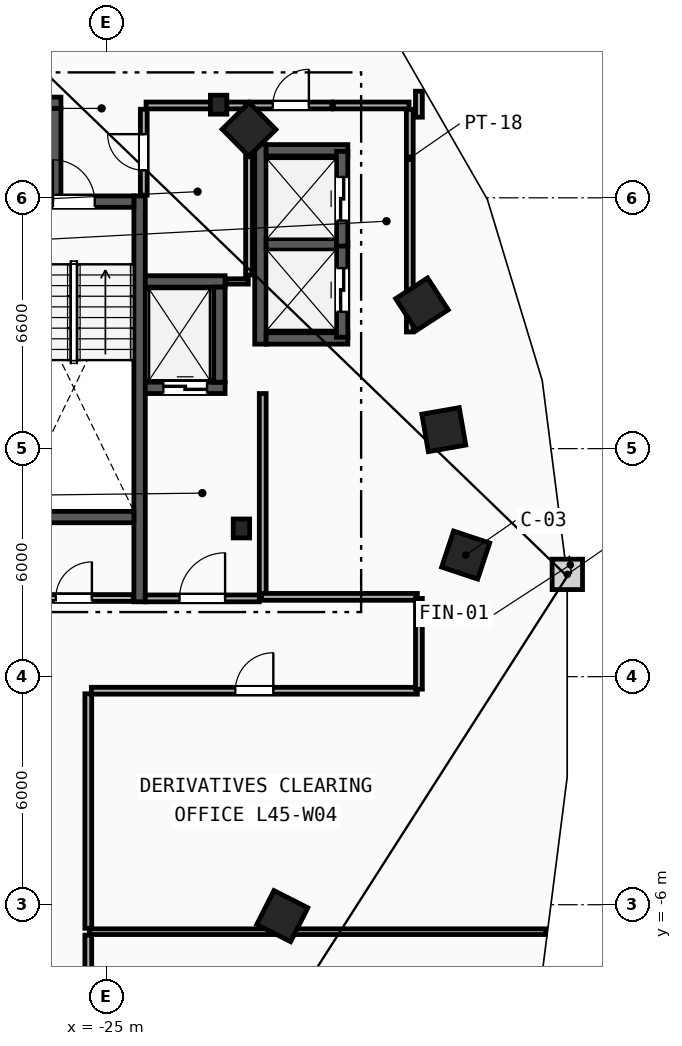
"""IFC4 building model, lengths in metres.
Left out: names, types, materials, properties, quantities, classifications, styles, units other than length and angle.
Written with IfcOpenShell. Run it as: python <this file> out.ifc"""

import sys

from ifc_helpers import new_model, si_unit, direction, frame, frame_2d, origin, origin_2d, place, context, subcontext, project, spatial, rectangle, i_section, extrude, element, fill, save


model = new_model("IFC4")
c1 = context("Model", 3, precision=1e-05, world=origin(), true_north=direction((0.0, 1.0)))
c2 = subcontext(c1, "Body", "Model", "MODEL_VIEW")
j1 = project(units=[si_unit("LENGTHUNIT", "METRE"), si_unit("PLANEANGLEUNIT", "RADIAN")], contexts=[c1])
p1 = place(None, origin())
s1 = spatial("IfcSite", under=j1, at=p1, CompositionType="ELEMENT")
p2 = place(p1, origin())
s2 = spatial("IfcBuilding", under=s1, at=p2, CompositionType="ELEMENT")
p3 = place(p2, frame((0.0, 0.0, 172.8)))
s3 = spatial("IfcBuildingStorey", under=s2, at=p3, CompositionType="ELEMENT", Elevation=172.8)
for number, where, z_axis, x_axis in (
    (1, (-21.45, 3.9, 0.0), (0.0, 0.0, 1.0), (1.0, 0.0, 0.0)),
    (2, (-22.05, 15.05, 0.0), (0.0, 0.0, 1.0), (1.0, 0.0, 0.0)),
):
    element("IfcColumn", number, at=place(p3, frame(where, z_axis=z_axis, x_axis=x_axis)), inside=s3, PredefinedType="COLUMN", context=c2, shape_type="SweptSolid", body=[
        extrude(i_section(OverallWidth=0.432, OverallDepth=0.498, WebThickness=0.056, FlangeThickness=0.089, FilletRadius=0.018, at=origin_2d()), origin(), (0.0, 0.0, 1.0), 3.6),
    ])
for number, where, z_axis, x_axis in (
    (3, (-15.55, 3.2, 0.0), (0.0, 0.0, 1.0), (0.315, 0.949, 0.0)),
    (4, (-16.125, 6.5, 0.0), (0.0, 0.0, 1.0), (-0.172, 0.985, 0.0)),
    (5, (-16.7, 9.8, 0.0), (0.0, 0.0, 1.0), (-0.544, 0.839, 0.0)),
    (6, (-21.25, 14.4, 0.0), (0.0, 0.0, 1.0), (-0.703, 0.711, 0.0)),
    (7, (-20.375, -6.3, 0.0), (0.0, 0.0, 1.0), (0.453, 0.892, 0.0)),
):
    element("IfcColumn", number, at=place(p3, frame(where, z_axis=z_axis, x_axis=x_axis)), inside=s3, PredefinedType="COLUMN", context=c2, shape_type="SweptSolid", body=[
        extrude(rectangle(XDim=1.0, YDim=1.0, at=origin_2d()), origin(), (0.0, 0.0, 1.0), 3.6),
    ])
p4 = place(p3, frame((-24.13, 1.97, 0.0), z_axis=(0.0, 0.0, 1.0), x_axis=(0.0, 1.0, 0.0)))
e8 = element("IfcWall", 8, at=p4, inside=s3, PredefinedType="SHEAR", context=c2, shape_type="SweptSolid", body=[
    extrude(rectangle(XDim=10.68, YDim=0.3, at=frame_2d((5.34, 0.0))), origin(), (0.0, 0.0, 1.0), 3.36),
])
p5 = place(p3, frame((-27.44, 12.5, 0.0), z_axis=(0.0, 0.0, 1.0), x_axis=(1.0, 0.0, 0.0)))
e9 = element("IfcWall", 9, at=p5, inside=s3, PredefinedType="SHEAR", context=c2, shape_type="SweptSolid", body=[
    extrude(rectangle(XDim=3.16, YDim=0.3, at=frame_2d((1.58, 0.0))), origin(), (0.0, 0.0, 1.0), 3.36),
])
p6 = place(p5, frame((1.03, 0.0, 0.0)))
e10 = element("IfcOpeningElement", 10, at=p6, cuts=e9, PredefinedType="OPENING", context=c2, shape_type="SweptSolid", body=[
    extrude(rectangle(XDim=1.1, YDim=2.15, at=frame_2d((0.55, 1.075))), frame((0.0, 0.16, 0.0), z_axis=(0.0, -1.0, 0.0), x_axis=(1.0, 0.0, 0.0)), (0.0, 0.0, 1.0), 0.32),
])
p7 = place(p3, frame((-27.44, 4.2, 0.0), z_axis=(0.0, 0.0, 1.0), x_axis=(1.0, 0.0, 0.0)))
e11 = element("IfcWall", 11, at=p7, inside=s3, PredefinedType="SHEAR", context=c2, shape_type="SweptSolid", body=[
    extrude(rectangle(XDim=3.16, YDim=0.3, at=frame_2d((1.58, 0.0))), origin(), (0.0, 0.0, 1.0), 3.36),
])
p8 = place(p3, frame((-20.89, 2.15, 0.0), z_axis=(0.0, 0.0, 1.0), x_axis=(0.0, 1.0, 0.0)))
e12 = element("IfcWall", 12, at=p8, inside=s3, PredefinedType="PARTITIONING", context=c2, shape_type="SweptSolid", body=[
    extrude(rectangle(XDim=5.3, YDim=0.18, at=frame_2d((2.65, 0.0))), origin(), (0.0, 0.0, 1.0), 3.36),
])
p9 = place(p3, frame((-23.98, 2.06, 0.0), z_axis=(0.0, 0.0, 1.0), x_axis=(1.0, 0.0, 0.0)))
e13 = element("IfcWall", 13, at=p9, inside=s3, PredefinedType="PARTITIONING", context=c2, shape_type="SweptSolid", body=[
    extrude(rectangle(XDim=3.0, YDim=0.18, at=frame_2d((1.5, 0.0))), origin(), (0.0, 0.0, 1.0), 3.36),
])
p10 = place(p9, frame((0.9, 0.0, 0.0)))
e14 = element("IfcOpeningElement", 14, at=p10, cuts=e13, PredefinedType="OPENING", context=c2, shape_type="SweptSolid", body=[
    extrude(rectangle(XDim=1.2, YDim=2.15, at=frame_2d((0.6, 1.075))), frame((0.0, 0.1, 0.0), z_axis=(0.0, -1.0, 0.0), x_axis=(1.0, 0.0, 0.0)), (0.0, 0.0, 1.0), 0.2),
])
p11 = place(p3, frame((-23.98, 7.6, 0.0), z_axis=(0.0, 0.0, 1.0), x_axis=(1.0, 0.0, 0.0)))
e15 = element("IfcWall", 15, at=p11, inside=s3, PredefinedType="SHEAR", context=c2, shape_type="SweptSolid", body=[
    extrude(rectangle(XDim=2.1, YDim=0.3, at=frame_2d((1.05, 0.0))), origin(), (0.0, 0.0, 1.0), 3.36),
])
p12 = place(p11, frame((0.475, 0.0, 0.0)))
e16 = element("IfcOpeningElement", 16, at=p12, cuts=e15, PredefinedType="OPENING", context=c2, shape_type="SweptSolid", body=[
    extrude(rectangle(XDim=1.15, YDim=2.2, at=frame_2d((0.575, 1.1))), frame((0.0, 0.16, 0.0), z_axis=(0.0, -1.0, 0.0), x_axis=(1.0, 0.0, 0.0)), (0.0, 0.0, 1.0), 0.32),
])
p13 = place(p3, frame((-23.98, 10.4, 0.0), z_axis=(0.0, 0.0, 1.0), x_axis=(1.0, 0.0, 0.0)))
e17 = element("IfcWall", 17, at=p13, inside=s3, PredefinedType="SHEAR", context=c2, shape_type="SweptSolid", body=[
    extrude(rectangle(XDim=2.1, YDim=0.3, at=frame_2d((1.05, 0.0))), origin(), (0.0, 0.0, 1.0), 3.36),
])
for number, where, z_axis, x_axis in (
    (18, (-22.03, 7.75, 0.0), (0.0, 0.0, 1.0), (0.0, 1.0, 0.0)),
    (19, (-28.7, 15.1, 0.0), (0.0, 0.0, 1.0), (1.0, 0.0, 0.0)),
):
    element("IfcWall", number, at=place(p3, frame(where, z_axis=z_axis, x_axis=x_axis)), inside=s3, PredefinedType="SHEAR", context=c2, shape_type="SweptSolid", body=[
        extrude(rectangle(XDim=2.5, YDim=0.3, at=frame_2d((1.25, 0.0))), origin(), (0.0, 0.0, 1.0), 3.36),
    ])
p14 = place(p3, frame((-26.35, 12.65, 0.0), z_axis=(0.0, 0.0, 1.0), x_axis=(0.0, 1.0, 0.0)))
e20 = element("IfcWall", 20, at=p14, inside=s3, PredefinedType="SHEAR", context=c2, shape_type="SweptSolid", body=[
    extrude(rectangle(XDim=2.3, YDim=0.3, at=frame_2d((1.15, 0.0))), origin(), (0.0, 0.0, 1.0), 3.36),
])
p15 = place(p3, frame((-20.95, 8.75, 0.0), z_axis=(0.0, 0.0, 1.0), x_axis=(0.0, 1.0, 0.0)))
e21 = element("IfcWall", 21, at=p15, inside=s3, PredefinedType="SHEAR", context=c2, shape_type="SweptSolid", body=[
    extrude(rectangle(XDim=5.25, YDim=0.3, at=frame_2d((2.625, 0.0))), origin(), (0.0, 0.0, 1.0), 3.36),
])
for number, where, z_axis, x_axis in (
    (22, (-20.8, 8.9, 0.0), (0.0, 0.0, 1.0), (1.0, 0.0, 0.0)),
    (23, (-20.8, 13.85, 0.0), (0.0, 0.0, 1.0), (1.0, 0.0, 0.0)),
):
    element("IfcWall", number, at=place(p3, frame(where, z_axis=z_axis, x_axis=x_axis)), inside=s3, PredefinedType="SHEAR", context=c2, shape_type="SweptSolid", body=[
        extrude(rectangle(XDim=2.15, YDim=0.3, at=frame_2d((1.075, 0.0))), origin(), (0.0, 0.0, 1.0), 3.36),
    ])
p16 = place(p3, frame((-20.8, 11.375, 0.0), z_axis=(0.0, 0.0, 1.0), x_axis=(1.0, 0.0, 0.0)))
e24 = element("IfcWall", 24, at=p16, inside=s3, PredefinedType="SHEAR", context=c2, shape_type="SweptSolid", body=[
    extrude(rectangle(XDim=1.85, YDim=0.3, at=frame_2d((0.925, 0.0))), origin(), (0.0, 0.0, 1.0), 3.36),
])
p17 = place(p3, frame((-18.8, 8.93, 0.0), z_axis=(0.0, 0.0, 1.0), x_axis=(0.0, 1.0, 0.0)))
e25 = element("IfcWall", 25, at=p17, inside=s3, PredefinedType="SHEAR", context=c2, shape_type="SweptSolid", body=[
    extrude(rectangle(XDim=2.49, YDim=0.3, at=frame_2d((1.245, 0.0))), origin(), (0.0, 0.0, 1.0), 3.36),
])
p18 = place(p17, frame((0.67, 0.0, 0.0)))
e26 = element("IfcOpeningElement", 26, at=p18, cuts=e25, PredefinedType="OPENING", context=c2, shape_type="SweptSolid", body=[
    extrude(rectangle(XDim=1.15, YDim=2.2, at=frame_2d((0.575, 1.1))), frame((0.0, 0.16, 0.0), z_axis=(0.0, -1.0, 0.0), x_axis=(1.0, 0.0, 0.0)), (0.0, 0.0, 1.0), 0.32),
])
p19 = place(p3, frame((-18.8, 11.33, 0.0), z_axis=(0.0, 0.0, 1.0), x_axis=(0.0, 1.0, 0.0)))
e27 = element("IfcWall", 27, at=p19, inside=s3, PredefinedType="SHEAR", context=c2, shape_type="SweptSolid", body=[
    extrude(rectangle(XDim=2.49, YDim=0.3, at=frame_2d((1.245, 0.0))), origin(), (0.0, 0.0, 1.0), 3.36),
])
p20 = place(p19, frame((0.67, 0.0, 0.0)))
e28 = element("IfcOpeningElement", 28, at=p20, cuts=e27, PredefinedType="OPENING", context=c2, shape_type="SweptSolid", body=[
    extrude(rectangle(XDim=1.15, YDim=2.2, at=frame_2d((0.575, 1.1))), frame((0.0, 0.16, 0.0), z_axis=(0.0, -1.0, 0.0), x_axis=(1.0, 0.0, 0.0)), (0.0, 0.0, 1.0), 0.32),
])
p21 = place(p3, frame((-17.02, 9.07, 0.0), z_axis=(0.0, 0.0, 1.0), x_axis=(0.0, 1.0, 0.0)))
e29 = element("IfcWall", 29, at=p21, inside=s3, PredefinedType="PARTITIONING", context=c2, shape_type="SweptSolid", body=[
    extrude(rectangle(XDim=5.86, YDim=0.18, at=frame_2d((2.93, 0.0))), origin(), (0.0, 0.0, 1.0), 3.36),
])
p22 = place(p3, frame((-21.23, 15.03, 0.0), z_axis=(0.0, 0.0, 1.0), x_axis=(1.0, 0.0, 0.0)))
e30 = element("IfcWall", 30, at=p22, inside=s3, PredefinedType="PARTITIONING", context=c2, shape_type="SweptSolid", body=[
    extrude(rectangle(XDim=2.16, YDim=0.18, at=frame_2d((1.08, 0.0))), origin(), (0.0, 0.0, 1.0), 3.36),
])
p23 = place(p22, frame((0.605, 0.0, 0.0)))
e31 = element("IfcOpeningElement", 31, at=p23, cuts=e30, PredefinedType="OPENING", context=c2, shape_type="SweptSolid", body=[
    extrude(rectangle(XDim=0.95, YDim=2.1, at=frame_2d((0.475, 1.05))), frame((0.0, 0.1, 0.0), z_axis=(0.0, -1.0, 0.0), x_axis=(1.0, 0.0, 0.0)), (0.0, 0.0, 1.0), 0.2),
])
p24 = place(p3, frame((-19.03, 15.03, 0.0), z_axis=(0.0, 0.0, 1.0), x_axis=(1.0, 0.0, 0.0)))
e32 = element("IfcWall", 32, at=p24, inside=s3, PredefinedType="PARTITIONING", context=c2, shape_type="SweptSolid", body=[
    extrude(rectangle(XDim=1.99, YDim=0.18, at=frame_2d((0.995, 0.0))), origin(), (0.0, 0.0, 1.0), 3.36),
])
p25 = place(p3, frame((-21.86, 10.4, 0.0), z_axis=(0.0, 0.0, 1.0), x_axis=(1.0, 0.0, 0.0)))
e33 = element("IfcWall", 33, at=p25, inside=s3, PredefinedType="PARTITIONING", context=c2, shape_type="SweptSolid", body=[
    extrude(rectangle(XDim=0.59, YDim=0.14, at=frame_2d((0.295, 0.0))), origin(), (0.0, 0.0, 1.0), 3.36),
])
p26 = place(p3, frame((-21.25, 10.57, 0.0), z_axis=(0.0, 0.0, 1.0), x_axis=(0.0, 1.0, 0.0)))
e34 = element("IfcWall", 34, at=p26, inside=s3, PredefinedType="PARTITIONING", context=c2, shape_type="SweptSolid", body=[
    extrude(rectangle(XDim=4.36, YDim=0.18, at=frame_2d((2.18, 0.0))), origin(), (0.0, 0.0, 1.0), 3.36),
])
p27 = place(p3, frame((-23.96, 15.03, 0.0), z_axis=(0.0, 0.0, 1.0), x_axis=(1.0, 0.0, 0.0)))
e35 = element("IfcWall", 35, at=p27, inside=s3, PredefinedType="PARTITIONING", context=c2, shape_type="SweptSolid", body=[
    extrude(rectangle(XDim=2.61, YDim=0.18, at=frame_2d((1.305, 0.0))), origin(), (0.0, 0.0, 1.0), 2.433),
])
p28 = place(p3, frame((-27.42, 2.07, 0.0), z_axis=(0.0, 0.0, 1.0), x_axis=(1.0, 0.0, 0.0)))
e36 = element("IfcWall", 36, at=p28, inside=s3, PredefinedType="PARTITIONING", context=c2, shape_type="SweptSolid", body=[
    extrude(rectangle(XDim=3.12, YDim=0.18, at=frame_2d((1.56, 0.0))), origin(), (0.0, 0.0, 1.0), 3.36),
])
p29 = place(p28, frame((1.085, 0.0, 0.0)))
e37 = element("IfcOpeningElement", 37, at=p29, cuts=e36, PredefinedType="OPENING", context=c2, shape_type="SweptSolid", body=[
    extrude(rectangle(XDim=0.95, YDim=2.1, at=frame_2d((0.475, 1.05))), frame((0.0, 0.1, 0.0), z_axis=(0.0, -1.0, 0.0), x_axis=(1.0, 0.0, 0.0)), (0.0, 0.0, 1.0), 0.2),
])
p30 = place(p3, frame((-24.02, 12.67, 0.0), z_axis=(0.0, 0.0, 1.0), x_axis=(0.0, 1.0, 0.0)))
e38 = element("IfcWall", 38, at=p30, inside=s3, PredefinedType="PARTITIONING", context=c2, shape_type="SweptSolid", body=[
    extrude(rectangle(XDim=2.26, YDim=0.18, at=frame_2d((1.13, 0.0))), origin(), (0.0, 0.0, 1.0), 3.36),
])
p31 = place(p30, frame((0.655, 0.0, 0.0)))
e39 = element("IfcOpeningElement", 39, at=p31, cuts=e38, PredefinedType="OPENING", context=c2, shape_type="SweptSolid", body=[
    extrude(rectangle(XDim=0.95, YDim=2.1, at=frame_2d((0.475, 1.05))), frame((0.0, 0.1, 0.0), z_axis=(0.0, -1.0, 0.0), x_axis=(1.0, 0.0, 0.0)), (0.0, 0.0, 1.0), 0.2),
])
p32 = place(p3, frame((-25.45, -6.71, 0.0), z_axis=(0.0, 0.0, 1.0), x_axis=(1.0, 0.0, 0.0)))
e40 = element("IfcWall", 40, at=p32, inside=s3, PredefinedType="PARTITIONING", context=c2, shape_type="SweptSolid", body=[
    extrude(rectangle(XDim=12.003, YDim=0.15, at=frame_2d((6.001, 0.0))), origin(), (0.0, 0.0, 1.0), 3.36),
])
p33 = place(p3, frame((-25.48, -11.178, 0.0), z_axis=(0.0, 0.0, 1.0), x_axis=(0.0, 1.0, 0.0)))
e41 = element("IfcWall", 41, at=p33, inside=s3, PredefinedType="PARTITIONING", context=c2, shape_type="SweptSolid", body=[
    extrude(rectangle(XDim=4.378, YDim=0.18, at=frame_2d((2.189, 0.0))), origin(), (0.0, 0.0, 1.0), 3.36),
])
p34 = place(p3, frame((-25.4, -0.37, 0.0), z_axis=(0.0, 0.0, 1.0), x_axis=(1.0, 0.0, 0.0)))
e42 = element("IfcWall", 42, at=p34, inside=s3, PredefinedType="PARTITIONING", context=c2, shape_type="SweptSolid", body=[
    extrude(rectangle(XDim=8.578, YDim=0.18, at=frame_2d((4.289, 0.0))), origin(), (0.0, 0.0, 1.0), 3.36),
])
p35 = place(p34, frame((3.789, 0.0, 0.0)))
e43 = element("IfcOpeningElement", 43, at=p35, cuts=e42, PredefinedType="OPENING", context=c2, shape_type="SweptSolid", body=[
    extrude(rectangle(XDim=1.0, YDim=2.15, at=frame_2d((0.5, 1.075))), frame((0.0, 0.1, 0.0), z_axis=(0.0, -1.0, 0.0), x_axis=(1.0, 0.0, 0.0)), (0.0, 0.0, 1.0), 0.2),
])
p36 = place(p3, frame((-25.48, -6.62, 0.0), z_axis=(0.0, 0.0, 1.0), x_axis=(0.0, 1.0, 0.0)))
e44 = element("IfcWall", 44, at=p36, inside=s3, PredefinedType="PARTITIONING", context=c2, shape_type="SweptSolid", body=[
    extrude(rectangle(XDim=6.17, YDim=0.18, at=frame_2d((3.085, 0.0))), origin(), (0.0, 0.0, 1.0), 3.36),
])
p37 = place(p3, frame((-16.822, 2.1, 0.0), z_axis=(0.0, 0.0, 1.0), x_axis=(-1.0, 0.0, 0.0)))
e45 = element("IfcWall", 45, at=p37, inside=s3, PredefinedType="PARTITIONING", context=c2, shape_type="SweptSolid", body=[
    extrude(rectangle(XDim=4.098, YDim=0.18, at=frame_2d((2.049, 0.0))), origin(), (0.0, 0.0, 1.0), 3.36),
])
p38 = place(p3, frame((-16.78, -0.329, 0.0), z_axis=(0.0, 0.0, 1.0), x_axis=(0.0, 1.0, 0.0)))
e46 = element("IfcWall", 46, at=p38, inside=s3, PredefinedType="PARTITIONING", context=c2, shape_type="SweptSolid", body=[
    extrude(rectangle(XDim=2.387, YDim=0.18, at=frame_2d((1.194, 0.0))), origin(), (0.0, 0.0, 1.0), 3.36),
])
p39 = place(p3, frame((-16.78, 14.721, 0.0), z_axis=(0.0, 0.0, 1.0), x_axis=(0.0, 1.0, 0.0)))
e47 = element("IfcWall", 47, at=p39, inside=s3, PredefinedType="PARTITIONING", context=c2, shape_type="SweptSolid", body=[
    extrude(rectangle(XDim=0.684, YDim=0.18, at=frame_2d((0.342, 0.0))), origin(), (0.0, 0.0, 1.0), 3.36),
])
p40 = place(p6, origin())
e48 = element("IfcDoor", 48, at=p40, inside=s3, OperationType="SINGLE_SWING_LEFT", PredefinedType="DOOR", context=c2, shape_type="SweptSolid", body=[
    extrude(rectangle(XDim=1.1, YDim=2.15, at=frame_2d((0.55, 1.075))), frame((0.0, 0.025, 0.0), z_axis=(0.0, -1.0, 0.0), x_axis=(1.0, 0.0, 0.0)), (0.0, 0.0, 1.0), 0.05),
])
fill(e10, e48)
p41 = place(p10, origin())
e49 = element("IfcDoor", 49, at=p41, inside=s3, OperationType="SINGLE_SWING_RIGHT", PredefinedType="DOOR", context=c2, shape_type="SweptSolid", body=[
    extrude(rectangle(XDim=1.2, YDim=2.15, at=frame_2d((0.6, 1.075))), frame((0.0, 0.025, 0.0), z_axis=(0.0, -1.0, 0.0), x_axis=(1.0, 0.0, 0.0)), (0.0, 0.0, 1.0), 0.05),
])
fill(e14, e49)
p42 = place(p12, origin())
e50 = element("IfcDoor", 50, at=p42, inside=s3, OperationType="SLIDING_TO_LEFT", PredefinedType="TRAPDOOR", context=c2, shape_type="SweptSolid", body=[
    extrude(rectangle(XDim=1.15, YDim=2.2, at=frame_2d((0.575, 1.1))), frame((0.0, 0.025, 0.0), z_axis=(0.0, -1.0, 0.0), x_axis=(1.0, 0.0, 0.0)), (0.0, 0.0, 1.0), 0.05),
])
fill(e16, e50)
p43 = place(p18, origin())
e51 = element("IfcDoor", 51, at=p43, inside=s3, OperationType="SLIDING_TO_LEFT", PredefinedType="TRAPDOOR", context=c2, shape_type="SweptSolid", body=[
    extrude(rectangle(XDim=1.15, YDim=2.2, at=frame_2d((0.575, 1.1))), frame((0.0, 0.025, 0.0), z_axis=(0.0, -1.0, 0.0), x_axis=(1.0, 0.0, 0.0)), (0.0, 0.0, 1.0), 0.05),
])
fill(e26, e51)
p44 = place(p20, origin())
e52 = element("IfcDoor", 52, at=p44, inside=s3, OperationType="SLIDING_TO_LEFT", PredefinedType="TRAPDOOR", context=c2, shape_type="SweptSolid", body=[
    extrude(rectangle(XDim=1.15, YDim=2.2, at=frame_2d((0.575, 1.1))), frame((0.0, 0.025, 0.0), z_axis=(0.0, -1.0, 0.0), x_axis=(1.0, 0.0, 0.0)), (0.0, 0.0, 1.0), 0.05),
])
fill(e28, e52)
p45 = place(p35, origin())
e53 = element("IfcDoor", 53, at=p45, inside=s3, OperationType="SINGLE_SWING_RIGHT", PredefinedType="DOOR", context=c2, shape_type="SweptSolid", body=[
    extrude(rectangle(XDim=1.0, YDim=2.15, at=frame_2d((0.5, 1.075))), frame((0.0, 0.025, 0.0), z_axis=(0.0, -1.0, 0.0), x_axis=(1.0, 0.0, 0.0)), (0.0, 0.0, 1.0), 0.05),
])
fill(e43, e53)
p46 = place(p29, origin())
e54 = element("IfcDoor", 54, at=p46, inside=s3, OperationType="SINGLE_SWING_RIGHT", PredefinedType="DOOR", context=c2, shape_type="SweptSolid", body=[
    extrude(rectangle(XDim=0.95, YDim=2.1, at=frame_2d((0.475, 1.05))), frame((0.0, 0.025, 0.0), z_axis=(0.0, -1.0, 0.0), x_axis=(1.0, 0.0, 0.0)), (0.0, 0.0, 1.0), 0.05),
])
fill(e37, e54)
p47 = place(p31, origin())
e55 = element("IfcDoor", 55, at=p47, inside=s3, OperationType="SINGLE_SWING_RIGHT", PredefinedType="DOOR", context=c2, shape_type="SweptSolid", body=[
    extrude(rectangle(XDim=0.95, YDim=2.1, at=frame_2d((0.475, 1.05))), frame((0.0, 0.025, 0.0), z_axis=(0.0, -1.0, 0.0), x_axis=(1.0, 0.0, 0.0)), (0.0, 0.0, 1.0), 0.05),
])
fill(e39, e55)
p48 = place(p23, origin())
e56 = element("IfcDoor", 56, at=p48, inside=s3, OperationType="SINGLE_SWING_RIGHT", PredefinedType="DOOR", context=c2, shape_type="SweptSolid", body=[
    extrude(rectangle(XDim=0.95, YDim=2.1, at=frame_2d((0.475, 1.05))), frame((0.0, 0.025, 0.0), z_axis=(0.0, -1.0, 0.0), x_axis=(1.0, 0.0, 0.0)), (0.0, 0.0, 1.0), 0.05),
])
fill(e31, e56)
save(model, sys.argv[1])
